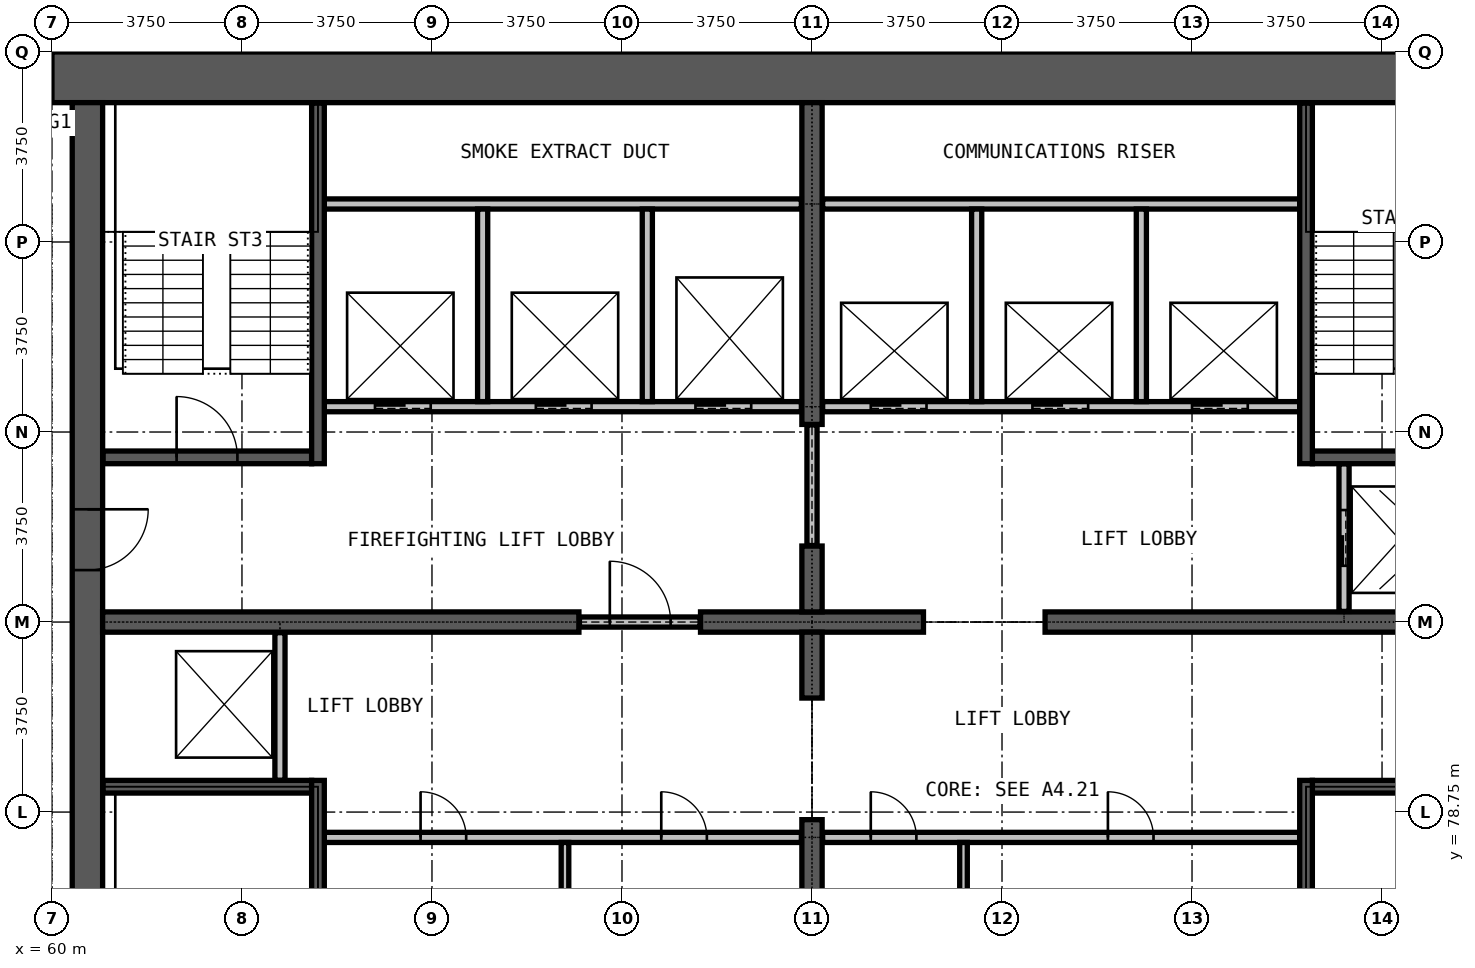
"""IFC4 building model, lengths in metres.
Left out: names, types, materials, properties, quantities, classifications, styles, units other than length and angle.
Written with IfcOpenShell. Run it as: python <this file> out.ifc"""

import sys

from ifc_helpers import new_model, si_unit, direction, frame, frame_2d, origin, place, context, subcontext, project, spatial, rectangle, extrude, element, fill, save


model = new_model("IFC4")
c1 = context("Model", 3, precision=1e-05, world=origin(), true_north=direction((0.0, 1.0)))
c2 = subcontext(c1, "Body", "Model", "MODEL_VIEW")
j1 = project(units=[si_unit("LENGTHUNIT", "METRE"), si_unit("PLANEANGLEUNIT", "RADIAN")], contexts=[c1])
p1 = place(None, origin())
s1 = spatial("IfcSite", under=j1, at=p1, CompositionType="ELEMENT")
p2 = place(p1, origin())
s2 = spatial("IfcBuilding", under=s1, at=p2, CompositionType="ELEMENT")
p3 = place(p2, frame((0.0, 0.0, 239.1)))
s3 = spatial("IfcBuildingStorey", under=s2, at=p3, CompositionType="ELEMENT", Elevation=239.1)
p4 = place(p3, frame((90.0, 93.25, 0.0), z_axis=(0.0, 0.0, 1.0), x_axis=(-1.0, 0.0, 0.0)))
e1 = element("IfcWall", 1, at=p4, inside=s3, PredefinedType="SHEAR", context=c2, shape_type="SweptSolid", body=[
    extrude(rectangle(XDim=30.0, YDim=1.0, at=frame_2d((15.0, 0.0))), origin(), (0.0, 0.0, 1.0), 3.6),
])
p5 = place(p3, frame((60.7, 92.75, 0.0), z_axis=(0.0, 0.0, 1.0), x_axis=(0.0, -1.0, 0.0)))
e2 = element("IfcWall", 2, at=p5, inside=s3, PredefinedType="SHEAR", context=c2, shape_type="SweptSolid", body=[
    extrude(rectangle(XDim=20.5, YDim=0.6, at=frame_2d((10.25, 0.0))), origin(), (0.0, 0.0, 1.0), 3.6),
])
p6 = place(p5, frame((19.025, 0.0, 0.0)))
e3 = element("IfcOpeningElement", 3, at=p6, cuts=e2, PredefinedType="OPENING", context=c2, shape_type="SweptSolid", body=[
    extrude(rectangle(XDim=1.2, YDim=2.2, at=frame_2d((0.6, 1.1))), frame((0.0, 0.31, 0.0), z_axis=(0.0, -1.0, 0.0), x_axis=(1.0, 0.0, 0.0)), (0.0, 0.0, 1.0), 0.62),
])
p7 = place(p5, frame((8.025, 0.0, 0.0)))
e4 = element("IfcOpeningElement", 4, at=p7, cuts=e2, PredefinedType="OPENING", context=c2, shape_type="SweptSolid", body=[
    extrude(rectangle(XDim=1.2, YDim=2.2, at=frame_2d((0.6, 1.1))), frame((0.0, 0.31, 0.0), z_axis=(0.0, -1.0, 0.0), x_axis=(1.0, 0.0, 0.0)), (0.0, 0.0, 1.0), 0.62),
])
p8 = place(p3, frame((61.0, 82.5, 0.0), z_axis=(0.0, 0.0, 1.0), x_axis=(1.0, 0.0, 0.0)))
e5 = element("IfcWall", 5, at=p8, inside=s3, PredefinedType="SHEAR", context=c2, shape_type="SweptSolid", body=[
    extrude(rectangle(XDim=9.4, YDim=0.4, at=frame_2d((4.7, 0.0))), origin(), (0.0, 0.0, 1.0), 3.6),
])
p9 = place(p3, frame((72.8, 82.5, 0.0), z_axis=(0.0, 0.0, 1.0), x_axis=(1.0, 0.0, 0.0)))
e6 = element("IfcWall", 6, at=p9, inside=s3, PredefinedType="SHEAR", context=c2, shape_type="SweptSolid", body=[
    extrude(rectangle(XDim=4.4, YDim=0.4, at=frame_2d((2.2, 0.0))), origin(), (0.0, 0.0, 1.0), 3.6),
])
p10 = place(p3, frame((79.6, 82.5, 0.0), z_axis=(0.0, 0.0, 1.0), x_axis=(1.0, 0.0, 0.0)))
e7 = element("IfcWall", 7, at=p10, inside=s3, PredefinedType="SHEAR", context=c2, shape_type="SweptSolid", body=[
    extrude(rectangle(XDim=9.4, YDim=0.4, at=frame_2d((4.7, 0.0))), origin(), (0.0, 0.0, 1.0), 3.6),
])
p11 = place(p3, frame((75.0, 72.25, 0.0), z_axis=(0.0, 0.0, 1.0), x_axis=(0.0, 1.0, 0.0)))
e8 = element("IfcWall", 8, at=p11, inside=s3, PredefinedType="SHEAR", context=c2, shape_type="SweptSolid", body=[
    extrude(rectangle(XDim=6.35, YDim=0.4, at=frame_2d((3.175, 0.0))), origin(), (0.0, 0.0, 1.0), 3.6),
])
for number, where, z_axis, x_axis in (
    (9, (75.0, 81.0, 0.0), (0.0, 0.0, 1.0), (0.0, 1.0, 0.0)),
    (10, (75.0, 82.7, 0.0), (0.0, 0.0, 1.0), (0.0, 1.0, 0.0)),
):
    element("IfcWall", number, at=place(p3, frame(where, z_axis=z_axis, x_axis=x_axis)), inside=s3, PredefinedType="SHEAR", context=c2, shape_type="SweptSolid", body=[
        extrude(rectangle(XDim=1.3, YDim=0.4, at=frame_2d((0.65, 0.0))), origin(), (0.0, 0.0, 1.0), 3.6),
    ])
p12 = place(p3, frame((75.0, 86.4, 0.0), z_axis=(0.0, 0.0, 1.0), x_axis=(0.0, 1.0, 0.0)))
e11 = element("IfcWall", 11, at=p12, inside=s3, PredefinedType="SHEAR", context=c2, shape_type="SweptSolid", body=[
    extrude(rectangle(XDim=6.35, YDim=0.4, at=frame_2d((3.175, 0.0))), origin(), (0.0, 0.0, 1.0), 3.6),
])
p13 = place(p3, frame((65.375, 78.25, 0.0), z_axis=(0.0, 0.0, 1.0), x_axis=(1.0, 0.0, 0.0)))
e12 = element("IfcWall", 12, at=p13, inside=s3, PredefinedType="PARTITIONING", context=c2, shape_type="SweptSolid", body=[
    extrude(rectangle(XDim=9.415, YDim=0.2, at=frame_2d((4.708, 0.0))), origin(), (0.0, 0.0, 1.0), 3.3),
])
p14 = place(p13, frame((1.9, 0.0, 0.0)))
e13 = element("IfcOpeningElement", 13, at=p14, cuts=e12, PredefinedType="OPENING", context=c2, shape_type="SweptSolid", body=[
    extrude(rectangle(XDim=0.9, YDim=2.2, at=frame_2d((0.45, 1.1))), frame((0.0, 0.11, 0.0), z_axis=(0.0, -1.0, 0.0), x_axis=(1.0, 0.0, 0.0)), (0.0, 0.0, 1.0), 0.22),
])
p15 = place(p13, frame((6.65, 0.0, 0.0)))
e14 = element("IfcOpeningElement", 14, at=p15, cuts=e12, PredefinedType="OPENING", context=c2, shape_type="SweptSolid", body=[
    extrude(rectangle(XDim=0.9, YDim=2.2, at=frame_2d((0.45, 1.1))), frame((0.0, 0.11, 0.0), z_axis=(0.0, -1.0, 0.0), x_axis=(1.0, 0.0, 0.0)), (0.0, 0.0, 1.0), 0.22),
])
p16 = place(p3, frame((75.21, 78.25, 0.0), z_axis=(0.0, 0.0, 1.0), x_axis=(1.0, 0.0, 0.0)))
e15 = element("IfcWall", 15, at=p16, inside=s3, PredefinedType="PARTITIONING", context=c2, shape_type="SweptSolid", body=[
    extrude(rectangle(XDim=9.415, YDim=0.2, at=frame_2d((4.708, 0.0))), origin(), (0.0, 0.0, 1.0), 3.3),
])
p17 = place(p16, frame((0.95, 0.0, 0.0)))
e16 = element("IfcOpeningElement", 16, at=p17, cuts=e15, PredefinedType="OPENING", context=c2, shape_type="SweptSolid", body=[
    extrude(rectangle(XDim=0.9, YDim=2.2, at=frame_2d((0.45, 1.1))), frame((0.0, 0.11, 0.0), z_axis=(0.0, -1.0, 0.0), x_axis=(1.0, 0.0, 0.0)), (0.0, 0.0, 1.0), 0.22),
])
p18 = place(p16, frame((5.63, 0.0, 0.0)))
e17 = element("IfcOpeningElement", 17, at=p18, cuts=e15, PredefinedType="OPENING", context=c2, shape_type="SweptSolid", body=[
    extrude(rectangle(XDim=0.9, YDim=2.2, at=frame_2d((0.45, 1.1))), frame((0.0, 0.11, 0.0), z_axis=(0.0, -1.0, 0.0), x_axis=(1.0, 0.0, 0.0)), (0.0, 0.0, 1.0), 0.22),
])
p19 = place(p3, frame((70.41, 82.5, 0.0), z_axis=(0.0, 0.0, 1.0), x_axis=(1.0, 0.0, 0.0)))
e18 = element("IfcWall", 18, at=p19, inside=s3, PredefinedType="PARTITIONING", context=c2, shape_type="SweptSolid", body=[
    extrude(rectangle(XDim=2.38, YDim=0.2, at=frame_2d((1.19, 0.0))), origin(), (0.0, 0.0, 1.0), 2.4),
])
p20 = place(p19, frame((0.6, 0.0, 0.0)))
e19 = element("IfcOpeningElement", 19, at=p20, cuts=e18, PredefinedType="OPENING", context=c2, shape_type="SweptSolid", body=[
    extrude(rectangle(XDim=1.2, YDim=2.2, at=frame_2d((0.6, 1.1))), frame((0.0, 0.11, 0.0), z_axis=(0.0, -1.0, 0.0), x_axis=(1.0, 0.0, 0.0)), (0.0, 0.0, 1.0), 0.22),
])
p21 = place(p3, frame((75.0, 84.01, 0.0), z_axis=(0.0, 0.0, 1.0), x_axis=(0.0, 1.0, 0.0)))
e20 = element("IfcWall", 20, at=p21, inside=s3, PredefinedType="PARTITIONING", context=c2, shape_type="SweptSolid", body=[
    extrude(rectangle(XDim=2.38, YDim=0.2, at=frame_2d((1.19, 0.0))), origin(), (0.0, 0.0, 1.0), 2.4),
])
for number, where, z_axis, x_axis in (
    (21, (70.125, 74.35, 0.0), (0.0, 0.0, 1.0), (0.0, 1.0, 0.0)),
    (22, (77.99, 74.35, 0.0), (0.0, 0.0, 1.0), (0.0, 1.0, 0.0)),
):
    element("IfcWall", number, at=place(p3, frame(where, z_axis=z_axis, x_axis=x_axis)), inside=s3, PredefinedType="PARTITIONING", context=c2, shape_type="SweptSolid", body=[
        extrude(rectangle(XDim=3.8, YDim=0.15, at=frame_2d((1.9, 0.0))), origin(), (0.0, 0.0, 1.0), 3.3),
    ])
p22 = place(p3, frame((65.375, 86.75, 0.0), z_axis=(0.0, 0.0, 1.0), x_axis=(1.0, 0.0, 0.0)))
e23 = element("IfcWall", 23, at=p22, inside=s3, PredefinedType="PARTITIONING", context=c2, shape_type="SweptSolid", body=[
    extrude(rectangle(XDim=9.415, YDim=0.2, at=frame_2d((4.708, 0.0))), origin(), (0.0, 0.0, 1.0), 3.3),
])
p23 = place(p22, frame((1.0, 0.0, 0.0)))
e24 = element("IfcOpeningElement", 24, at=p23, cuts=e23, PredefinedType="OPENING", context=c2, shape_type="SweptSolid", body=[
    extrude(rectangle(XDim=1.1, YDim=2.2, at=frame_2d((0.55, 1.1))), frame((0.0, 0.11, 0.0), z_axis=(0.0, -1.0, 0.0), x_axis=(1.0, 0.0, 0.0)), (0.0, 0.0, 1.0), 0.22),
])
p24 = place(p22, frame((4.175, 0.0, 0.0)))
e25 = element("IfcOpeningElement", 25, at=p24, cuts=e23, PredefinedType="OPENING", context=c2, shape_type="SweptSolid", body=[
    extrude(rectangle(XDim=1.1, YDim=2.2, at=frame_2d((0.55, 1.1))), frame((0.0, 0.11, 0.0), z_axis=(0.0, -1.0, 0.0), x_axis=(1.0, 0.0, 0.0)), (0.0, 0.0, 1.0), 0.22),
])
p25 = place(p22, frame((7.325, 0.0, 0.0)))
e26 = element("IfcOpeningElement", 26, at=p25, cuts=e23, PredefinedType="OPENING", context=c2, shape_type="SweptSolid", body=[
    extrude(rectangle(XDim=1.1, YDim=2.2, at=frame_2d((0.55, 1.1))), frame((0.0, 0.11, 0.0), z_axis=(0.0, -1.0, 0.0), x_axis=(1.0, 0.0, 0.0)), (0.0, 0.0, 1.0), 0.22),
])
p26 = place(p3, frame((75.21, 86.75, 0.0), z_axis=(0.0, 0.0, 1.0), x_axis=(1.0, 0.0, 0.0)))
e27 = element("IfcWall", 27, at=p26, inside=s3, PredefinedType="PARTITIONING", context=c2, shape_type="SweptSolid", body=[
    extrude(rectangle(XDim=9.415, YDim=0.2, at=frame_2d((4.708, 0.0))), origin(), (0.0, 0.0, 1.0), 3.3),
])
p27 = place(p26, frame((0.95, 0.0, 0.0)))
e28 = element("IfcOpeningElement", 28, at=p27, cuts=e27, PredefinedType="OPENING", context=c2, shape_type="SweptSolid", body=[
    extrude(rectangle(XDim=1.1, YDim=2.2, at=frame_2d((0.55, 1.1))), frame((0.0, 0.11, 0.0), z_axis=(0.0, -1.0, 0.0), x_axis=(1.0, 0.0, 0.0)), (0.0, 0.0, 1.0), 0.22),
])
p28 = place(p26, frame((4.14, 0.0, 0.0)))
e29 = element("IfcOpeningElement", 29, at=p28, cuts=e27, PredefinedType="OPENING", context=c2, shape_type="SweptSolid", body=[
    extrude(rectangle(XDim=1.1, YDim=2.2, at=frame_2d((0.55, 1.1))), frame((0.0, 0.11, 0.0), z_axis=(0.0, -1.0, 0.0), x_axis=(1.0, 0.0, 0.0)), (0.0, 0.0, 1.0), 0.22),
])
p29 = place(p26, frame((7.29, 0.0, 0.0)))
e30 = element("IfcOpeningElement", 30, at=p29, cuts=e27, PredefinedType="OPENING", context=c2, shape_type="SweptSolid", body=[
    extrude(rectangle(XDim=1.1, YDim=2.2, at=frame_2d((0.55, 1.1))), frame((0.0, 0.11, 0.0), z_axis=(0.0, -1.0, 0.0), x_axis=(1.0, 0.0, 0.0)), (0.0, 0.0, 1.0), 0.22),
])
for number, where, z_axis, x_axis in (
    (31, (65.375, 90.75, 0.0), (0.0, 0.0, 1.0), (1.0, 0.0, 0.0)),
    (32, (75.21, 90.75, 0.0), (0.0, 0.0, 1.0), (1.0, 0.0, 0.0)),
):
    element("IfcWall", number, at=place(p3, frame(where, z_axis=z_axis, x_axis=x_axis)), inside=s3, PredefinedType="PARTITIONING", context=c2, shape_type="SweptSolid", body=[
        extrude(rectangle(XDim=9.415, YDim=0.2, at=frame_2d((4.708, 0.0))), origin(), (0.0, 0.0, 1.0), 3.3),
    ])
p30 = place(p3, frame((64.5, 79.375, 0.0), z_axis=(0.0, 0.0, 1.0), x_axis=(0.0, 1.0, 0.0)))
e33 = element("IfcWall", 33, at=p30, inside=s3, PredefinedType="PARTITIONING", context=c2, shape_type="SweptSolid", body=[
    extrude(rectangle(XDim=2.915, YDim=0.2, at=frame_2d((1.458, 0.0))), origin(), (0.0, 0.0, 1.0), 3.3),
])
for number, where, z_axis, x_axis in (
    (34, (68.5, 86.85, 0.0), (0.0, 0.0, 1.0), (0.0, 1.0, 0.0)),
    (35, (71.75, 86.85, 0.0), (0.0, 0.0, 1.0), (0.0, 1.0, 0.0)),
    (36, (78.25, 86.85, 0.0), (0.0, 0.0, 1.0), (0.0, 1.0, 0.0)),
    (37, (81.5, 86.85, 0.0), (0.0, 0.0, 1.0), (0.0, 1.0, 0.0)),
):
    element("IfcWall", number, at=place(p3, frame(where, z_axis=z_axis, x_axis=x_axis)), inside=s3, PredefinedType="PARTITIONING", context=c2, shape_type="SweptSolid", body=[
        extrude(rectangle(XDim=3.8, YDim=0.2, at=frame_2d((1.9, 0.0))), origin(), (0.0, 0.0, 1.0), 3.3),
    ])
p31 = place(p3, frame((85.5, 82.71, 0.0), z_axis=(0.0, 0.0, 1.0), x_axis=(0.0, 1.0, 0.0)))
e38 = element("IfcWall", 38, at=p31, inside=s3, PredefinedType="PARTITIONING", context=c2, shape_type="SweptSolid", body=[
    extrude(rectangle(XDim=2.915, YDim=0.2, at=frame_2d((1.458, 0.0))), origin(), (0.0, 0.0, 1.0), 3.3),
])
p32 = place(p31, frame((0.9, 0.0, 0.0)))
e39 = element("IfcOpeningElement", 39, at=p32, cuts=e38, PredefinedType="OPENING", context=c2, shape_type="SweptSolid", body=[
    extrude(rectangle(XDim=1.1, YDim=2.2, at=frame_2d((0.55, 1.1))), frame((0.0, 0.11, 0.0), z_axis=(0.0, -1.0, 0.0), x_axis=(1.0, 0.0, 0.0)), (0.0, 0.0, 1.0), 0.22),
])
for number, where, z_axis, x_axis in (
    (40, (61.01, 79.25, 0.0), (0.0, 0.0, 1.0), (1.0, 0.0, 0.0)),
    (41, (84.875, 79.25, 0.0), (0.0, 0.0, 1.0), (1.0, 0.0, 0.0)),
):
    element("IfcWall", number, at=place(p3, frame(where, z_axis=z_axis, x_axis=x_axis)), inside=s3, PredefinedType="PARTITIONING", context=c2, shape_type="SweptSolid", body=[
        extrude(rectangle(XDim=4.115, YDim=0.25, at=frame_2d((2.058, 0.0))), origin(), (0.0, 0.0, 1.0), 3.3),
    ])
p33 = place(p3, frame((61.01, 85.75, 0.0), z_axis=(0.0, 0.0, 1.0), x_axis=(1.0, 0.0, 0.0)))
e42 = element("IfcWall", 42, at=p33, inside=s3, PredefinedType="PARTITIONING", context=c2, shape_type="SweptSolid", body=[
    extrude(rectangle(XDim=4.115, YDim=0.25, at=frame_2d((2.058, 0.0))), origin(), (0.0, 0.0, 1.0), 3.3),
])
p34 = place(p33, frame((1.45, 0.0, 0.0)))
e43 = element("IfcOpeningElement", 43, at=p34, cuts=e42, PredefinedType="OPENING", context=c2, shape_type="SweptSolid", body=[
    extrude(rectangle(XDim=1.2, YDim=2.2, at=frame_2d((0.6, 1.1))), frame((0.0, 0.135, 0.0), z_axis=(0.0, -1.0, 0.0), x_axis=(1.0, 0.0, 0.0)), (0.0, 0.0, 1.0), 0.27),
])
p35 = place(p3, frame((84.875, 85.75, 0.0), z_axis=(0.0, 0.0, 1.0), x_axis=(1.0, 0.0, 0.0)))
e44 = element("IfcWall", 44, at=p35, inside=s3, PredefinedType="PARTITIONING", context=c2, shape_type="SweptSolid", body=[
    extrude(rectangle(XDim=4.115, YDim=0.25, at=frame_2d((2.058, 0.0))), origin(), (0.0, 0.0, 1.0), 3.3),
])
for number, where, z_axis, x_axis in (
    (45, (65.25, 72.26, 0.0), (0.0, 0.0, 1.0), (0.0, 1.0, 0.0)),
    (46, (65.25, 85.625, 0.0), (0.0, 0.0, 1.0), (0.0, 1.0, 0.0)),
    (47, (84.75, 72.26, 0.0), (0.0, 0.0, 1.0), (0.0, 1.0, 0.0)),
    (48, (84.75, 85.625, 0.0), (0.0, 0.0, 1.0), (0.0, 1.0, 0.0)),
):
    element("IfcWall", number, at=place(p3, frame(where, z_axis=z_axis, x_axis=x_axis)), inside=s3, PredefinedType="PARTITIONING", context=c2, shape_type="SweptSolid", body=[
        extrude(rectangle(XDim=7.115, YDim=0.25, at=frame_2d((3.558, 0.0))), origin(), (0.0, 0.0, 1.0), 3.3),
    ])
p36 = place(p27, origin())
e49 = element("IfcDoor", 49, at=p36, inside=s3, OperationType="DOUBLE_DOOR_SLIDING", PredefinedType="DOOR", context=c2, shape_type="SweptSolid", body=[
    extrude(rectangle(XDim=1.1, YDim=2.2, at=frame_2d((0.55, 1.1))), frame((0.0, 0.025, 0.0), z_axis=(0.0, -1.0, 0.0), x_axis=(1.0, 0.0, 0.0)), (0.0, 0.0, 1.0), 0.05),
])
fill(e28, e49)
p37 = place(p28, origin())
e50 = element("IfcDoor", 50, at=p37, inside=s3, OperationType="DOUBLE_DOOR_SLIDING", PredefinedType="DOOR", context=c2, shape_type="SweptSolid", body=[
    extrude(rectangle(XDim=1.1, YDim=2.2, at=frame_2d((0.55, 1.1))), frame((0.0, 0.025, 0.0), z_axis=(0.0, -1.0, 0.0), x_axis=(1.0, 0.0, 0.0)), (0.0, 0.0, 1.0), 0.05),
])
fill(e29, e50)
p38 = place(p29, origin())
e51 = element("IfcDoor", 51, at=p38, inside=s3, OperationType="DOUBLE_DOOR_SLIDING", PredefinedType="DOOR", context=c2, shape_type="SweptSolid", body=[
    extrude(rectangle(XDim=1.1, YDim=2.2, at=frame_2d((0.55, 1.1))), frame((0.0, 0.025, 0.0), z_axis=(0.0, -1.0, 0.0), x_axis=(1.0, 0.0, 0.0)), (0.0, 0.0, 1.0), 0.05),
])
fill(e30, e51)
p39 = place(p23, origin())
e52 = element("IfcDoor", 52, at=p39, inside=s3, OperationType="DOUBLE_DOOR_SLIDING", PredefinedType="DOOR", context=c2, shape_type="SweptSolid", body=[
    extrude(rectangle(XDim=1.1, YDim=2.2, at=frame_2d((0.55, 1.1))), frame((0.0, 0.025, 0.0), z_axis=(0.0, -1.0, 0.0), x_axis=(1.0, 0.0, 0.0)), (0.0, 0.0, 1.0), 0.05),
])
fill(e24, e52)
p40 = place(p24, origin())
e53 = element("IfcDoor", 53, at=p40, inside=s3, OperationType="DOUBLE_DOOR_SLIDING", PredefinedType="DOOR", context=c2, shape_type="SweptSolid", body=[
    extrude(rectangle(XDim=1.1, YDim=2.2, at=frame_2d((0.55, 1.1))), frame((0.0, 0.025, 0.0), z_axis=(0.0, -1.0, 0.0), x_axis=(1.0, 0.0, 0.0)), (0.0, 0.0, 1.0), 0.05),
])
fill(e25, e53)
p41 = place(p25, origin())
e54 = element("IfcDoor", 54, at=p41, inside=s3, OperationType="DOUBLE_DOOR_SLIDING", PredefinedType="DOOR", context=c2, shape_type="SweptSolid", body=[
    extrude(rectangle(XDim=1.1, YDim=2.2, at=frame_2d((0.55, 1.1))), frame((0.0, 0.025, 0.0), z_axis=(0.0, -1.0, 0.0), x_axis=(1.0, 0.0, 0.0)), (0.0, 0.0, 1.0), 0.05),
])
fill(e26, e54)
p42 = place(p32, origin())
e55 = element("IfcDoor", 55, at=p42, inside=s3, OperationType="DOUBLE_DOOR_SLIDING", PredefinedType="DOOR", context=c2, shape_type="SweptSolid", body=[
    extrude(rectangle(XDim=1.1, YDim=2.2, at=frame_2d((0.55, 1.1))), frame((0.0, 0.025, 0.0), z_axis=(0.0, -1.0, 0.0), x_axis=(1.0, 0.0, 0.0)), (0.0, 0.0, 1.0), 0.05),
])
fill(e39, e55)
p43 = place(p20, origin())
e56 = element("IfcDoor", 56, at=p43, inside=s3, OperationType="SINGLE_SWING_LEFT", PredefinedType="DOOR", context=c2, shape_type="SweptSolid", body=[
    extrude(rectangle(XDim=1.2, YDim=2.2, at=frame_2d((0.6, 1.1))), frame((0.0, 0.025, 0.0), z_axis=(0.0, -1.0, 0.0), x_axis=(1.0, 0.0, 0.0)), (0.0, 0.0, 1.0), 0.05),
])
fill(e19, e56)
p44 = place(p34, origin())
e57 = element("IfcDoor", 57, at=p44, inside=s3, OperationType="SINGLE_SWING_RIGHT", PredefinedType="DOOR", context=c2, shape_type="SweptSolid", body=[
    extrude(rectangle(XDim=1.2, YDim=2.2, at=frame_2d((0.6, 1.1))), frame((0.0, 0.025, 0.0), z_axis=(0.0, -1.0, 0.0), x_axis=(1.0, 0.0, 0.0)), (0.0, 0.0, 1.0), 0.05),
])
fill(e43, e57)
p45 = place(p7, origin())
e58 = element("IfcDoor", 58, at=p45, inside=s3, OperationType="SINGLE_SWING_LEFT", PredefinedType="DOOR", context=c2, shape_type="SweptSolid", body=[
    extrude(rectangle(XDim=1.2, YDim=2.2, at=frame_2d((0.6, 1.1))), frame((0.0, 0.025, 0.0), z_axis=(0.0, -1.0, 0.0), x_axis=(1.0, 0.0, 0.0)), (0.0, 0.0, 1.0), 0.05),
])
fill(e4, e58)
p46 = place(p14, origin())
e59 = element("IfcDoor", 59, at=p46, inside=s3, OperationType="SINGLE_SWING_LEFT", PredefinedType="DOOR", context=c2, shape_type="SweptSolid", body=[
    extrude(rectangle(XDim=0.9, YDim=2.2, at=frame_2d((0.45, 1.1))), frame((0.0, 0.025, 0.0), z_axis=(0.0, -1.0, 0.0), x_axis=(1.0, 0.0, 0.0)), (0.0, 0.0, 1.0), 0.05),
])
fill(e13, e59)
p47 = place(p15, origin())
e60 = element("IfcDoor", 60, at=p47, inside=s3, OperationType="SINGLE_SWING_RIGHT", PredefinedType="DOOR", context=c2, shape_type="SweptSolid", body=[
    extrude(rectangle(XDim=0.9, YDim=2.2, at=frame_2d((0.45, 1.1))), frame((0.0, 0.025, 0.0), z_axis=(0.0, -1.0, 0.0), x_axis=(1.0, 0.0, 0.0)), (0.0, 0.0, 1.0), 0.05),
])
fill(e14, e60)
p48 = place(p17, origin())
e61 = element("IfcDoor", 61, at=p48, inside=s3, OperationType="SINGLE_SWING_RIGHT", PredefinedType="DOOR", context=c2, shape_type="SweptSolid", body=[
    extrude(rectangle(XDim=0.9, YDim=2.2, at=frame_2d((0.45, 1.1))), frame((0.0, 0.025, 0.0), z_axis=(0.0, -1.0, 0.0), x_axis=(1.0, 0.0, 0.0)), (0.0, 0.0, 1.0), 0.05),
])
fill(e16, e61)
p49 = place(p18, origin())
e62 = element("IfcDoor", 62, at=p49, inside=s3, OperationType="SINGLE_SWING_LEFT", PredefinedType="DOOR", context=c2, shape_type="SweptSolid", body=[
    extrude(rectangle(XDim=0.9, YDim=2.2, at=frame_2d((0.45, 1.1))), frame((0.0, 0.025, 0.0), z_axis=(0.0, -1.0, 0.0), x_axis=(1.0, 0.0, 0.0)), (0.0, 0.0, 1.0), 0.05),
])
fill(e17, e62)
save(model, sys.argv[1])
